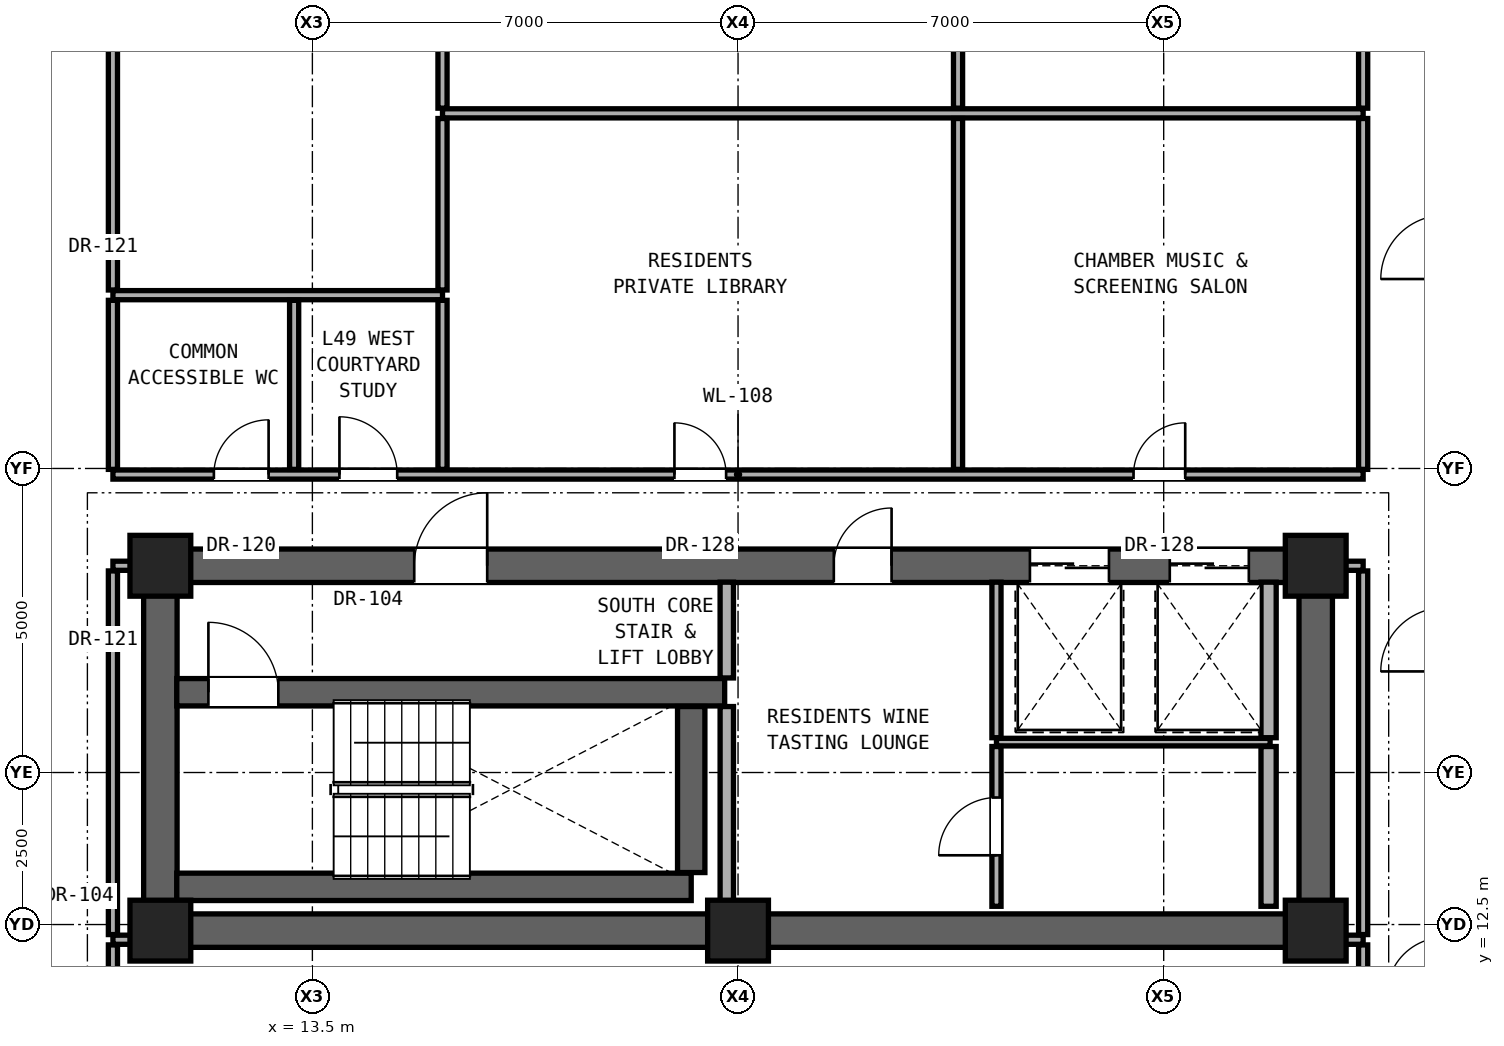
"""IFC4 building model, lengths in metres.
Left out: names, types, materials, properties, quantities, classifications, styles, units other than length and angle.
Written with IfcOpenShell. Run it as: python <this file> out.ifc"""

import sys

from ifc_helpers import new_model, si_unit, direction, frame, frame_2d, origin, origin_2d, place, context, subcontext, project, spatial, rectangle, extrude, element, fill, save


model = new_model("IFC4")
c1 = context("Model", 3, precision=1e-05, world=origin(), true_north=direction((0.0, 1.0)))
c2 = subcontext(c1, "Body", "Model", "MODEL_VIEW")
j1 = project(units=[si_unit("LENGTHUNIT", "METRE"), si_unit("PLANEANGLEUNIT", "RADIAN")], contexts=[c1])
p1 = place(None, origin())
s1 = spatial("IfcSite", under=j1, at=p1, CompositionType="ELEMENT")
p2 = place(p1, origin())
s2 = spatial("IfcBuilding", under=s1, at=p2, CompositionType="ELEMENT")
p3 = place(p2, frame((0.0, 0.0, 173.9)))
s3 = spatial("IfcBuildingStorey", under=s2, at=p3, CompositionType="ELEMENT", Elevation=173.9)
for number, where, z_axis, x_axis in (
    (1, (11.0, 12.4, 0.0), (0.0, 0.0, 1.0), (1.0, 0.0, 0.0)),
    (2, (20.5, 12.4, 0.0), (0.0, 0.0, 1.0), (1.0, 0.0, 0.0)),
    (3, (30.0, 12.4, 0.0), (0.0, 0.0, 1.0), (1.0, 0.0, 0.0)),
    (4, (11.0, 18.4, 0.0), (0.0, 0.0, 1.0), (1.0, 0.0, 0.0)),
    (5, (30.0, 18.4, 0.0), (0.0, 0.0, 1.0), (1.0, 0.0, 0.0)),
):
    element("IfcColumn", number, at=place(p3, frame(where, z_axis=z_axis, x_axis=x_axis)), inside=s3, PredefinedType="COLUMN", context=c2, shape_type="SweptSolid", body=[
        extrude(rectangle(XDim=1.0, YDim=1.0, at=origin_2d()), origin(), (0.0, 0.0, 1.0), 3.25),
    ])
p4 = place(p3, frame((11.0, 12.4, 0.0), z_axis=(0.0, 0.0, 1.0), x_axis=(1.0, 0.0, 0.0)))
e6 = element("IfcWall", 6, at=p4, inside=s3, PredefinedType="SHEAR", context=c2, shape_type="SweptSolid", body=[
    extrude(rectangle(XDim=19.0, YDim=0.55, at=frame_2d((9.5, 0.0))), origin(), (0.0, 0.0, 1.0), 3.05),
])
for number, where, z_axis, x_axis in (
    (7, (11.0, 12.4, 0.0), (0.0, 0.0, 1.0), (0.0, 1.0, 0.0)),
    (8, (30.0, 12.4, 0.0), (0.0, 0.0, 1.0), (0.0, 1.0, 0.0)),
):
    element("IfcWall", number, at=place(p3, frame(where, z_axis=z_axis, x_axis=x_axis)), inside=s3, PredefinedType="SHEAR", context=c2, shape_type="SweptSolid", body=[
        extrude(rectangle(XDim=6.0, YDim=0.55, at=frame_2d((3.0, 0.0))), origin(), (0.0, 0.0, 1.0), 3.05),
    ])
p5 = place(p3, frame((11.0, 18.4, 0.0), z_axis=(0.0, 0.0, 1.0), x_axis=(1.0, 0.0, 0.0)))
e9 = element("IfcWall", 9, at=p5, inside=s3, PredefinedType="SHEAR", context=c2, shape_type="SweptSolid", body=[
    extrude(rectangle(XDim=19.0, YDim=0.55, at=frame_2d((9.5, 0.0))), origin(), (0.0, 0.0, 1.0), 3.05),
])
p6 = place(p5, frame((4.175, 0.0, 0.0)))
e10 = element("IfcOpeningElement", 10, at=p6, cuts=e9, PredefinedType="OPENING", context=c2, shape_type="SweptSolid", body=[
    extrude(rectangle(XDim=1.2, YDim=2.25, at=frame_2d((0.6, 1.125))), frame((0.0, 0.285, 0.0), z_axis=(0.0, -1.0, 0.0), x_axis=(1.0, 0.0, 0.0)), (0.0, 0.0, 1.0), 0.57),
])
p7 = place(p5, frame((11.075, 0.0, 0.0)))
e11 = element("IfcOpeningElement", 11, at=p7, cuts=e9, PredefinedType="OPENING", context=c2, shape_type="SweptSolid", body=[
    extrude(rectangle(XDim=0.95, YDim=2.15, at=frame_2d((0.475, 1.075))), frame((0.0, 0.285, 0.0), z_axis=(0.0, -1.0, 0.0), x_axis=(1.0, 0.0, 0.0)), (0.0, 0.0, 1.0), 0.57),
])
p8 = place(p5, frame((14.3, 0.0, 0.0)))
e12 = element("IfcOpeningElement", 12, at=p8, cuts=e9, PredefinedType="OPENING", context=c2, shape_type="SweptSolid", body=[
    extrude(rectangle(XDim=1.3, YDim=2.3, at=frame_2d((0.65, 1.15))), frame((0.0, 0.285, 0.0), z_axis=(0.0, -1.0, 0.0), x_axis=(1.0, 0.0, 0.0)), (0.0, 0.0, 1.0), 0.57),
])
p9 = place(p5, frame((16.6, 0.0, 0.0)))
e13 = element("IfcOpeningElement", 13, at=p9, cuts=e9, PredefinedType="OPENING", context=c2, shape_type="SweptSolid", body=[
    extrude(rectangle(XDim=1.3, YDim=2.3, at=frame_2d((0.65, 1.15))), frame((0.0, 0.285, 0.0), z_axis=(0.0, -1.0, 0.0), x_axis=(1.0, 0.0, 0.0)), (0.0, 0.0, 1.0), 0.57),
])
for number, where, z_axis, x_axis in (
    (14, (10.22, 12.25, 0.0), (0.0, 0.0, 1.0), (1.0, 0.0, 0.0)),
    (15, (30.27, 12.25, 0.0), (0.0, 0.0, 1.0), (1.0, 0.0, 0.0)),
):
    element("IfcWall", number, at=place(p3, frame(where, z_axis=z_axis, x_axis=x_axis)), inside=s3, PredefinedType="PARTITIONING", context=c2, shape_type="SweptSolid", body=[
        extrude(rectangle(XDim=0.51, YDim=0.15, at=frame_2d((0.255, 0.0))), origin(), (0.0, 0.0, 1.0), 3.05),
    ])
p10 = place(p3, frame((11.27, 13.12, 0.0), z_axis=(0.0, 0.0, 1.0), x_axis=(1.0, 0.0, 0.0)))
e16 = element("IfcWall", 16, at=p10, inside=s3, PredefinedType="SHEAR", context=c2, shape_type="SweptSolid", body=[
    extrude(rectangle(XDim=8.46, YDim=0.45, at=frame_2d((4.23, 0.0))), origin(), (0.0, 0.0, 1.0), 3.05),
])
p11 = place(p3, frame((24.75, 15.5, 0.0), z_axis=(0.0, 0.0, 1.0), x_axis=(1.0, 0.0, 0.0)))
e17 = element("IfcWall", 17, at=p11, inside=s3, PredefinedType="PARTITIONING", context=c2, shape_type="SweptSolid", body=[
    extrude(rectangle(XDim=4.5, YDim=0.125, at=frame_2d((2.25, 0.0))), origin(), (0.0, 0.0, 1.0), 3.05),
])
p12 = place(p3, frame((11.27, 16.32, 0.0), z_axis=(0.0, 0.0, 1.0), x_axis=(1.0, 0.0, 0.0)))
e18 = element("IfcWall", 18, at=p12, inside=s3, PredefinedType="SHEAR", context=c2, shape_type="SweptSolid", body=[
    extrude(rectangle(XDim=9.01, YDim=0.45, at=frame_2d((4.505, 0.0))), origin(), (0.0, 0.0, 1.0), 3.05),
])
p13 = place(p12, frame((0.52, 0.0, 0.0)))
e19 = element("IfcOpeningElement", 19, at=p13, cuts=e18, PredefinedType="OPENING", context=c2, shape_type="SweptSolid", body=[
    extrude(rectangle(XDim=1.15, YDim=2.2, at=frame_2d((0.575, 1.1))), frame((0.0, 0.235, 0.0), z_axis=(0.0, -1.0, 0.0), x_axis=(1.0, 0.0, 0.0)), (0.0, 0.0, 1.0), 0.47),
])
for number, where, z_axis, x_axis in (
    (20, (10.22, 18.4, 0.0), (0.0, 0.0, 1.0), (1.0, 0.0, 0.0)),
    (21, (30.27, 18.4, 0.0), (0.0, 0.0, 1.0), (1.0, 0.0, 0.0)),
):
    element("IfcWall", number, at=place(p3, frame(where, z_axis=z_axis, x_axis=x_axis)), inside=s3, PredefinedType="PARTITIONING", context=c2, shape_type="SweptSolid", body=[
        extrude(rectangle(XDim=0.51, YDim=0.15, at=frame_2d((0.255, 0.0))), origin(), (0.0, 0.0, 1.0), 2.442),
    ])
p14 = place(p3, frame((10.22, 19.9, 0.0), z_axis=(0.0, 0.0, 1.0), x_axis=(1.0, 0.0, 0.0)))
e22 = element("IfcWall", 22, at=p14, inside=s3, PredefinedType="PARTITIONING", context=c2, shape_type="SweptSolid", body=[
    extrude(rectangle(XDim=20.56, YDim=0.15, at=frame_2d((10.28, 0.0))), origin(), (0.0, 0.0, 1.0), 2.186),
])
p15 = place(p14, frame((1.66, 0.0, 0.0)))
e23 = element("IfcOpeningElement", 23, at=p15, cuts=e22, PredefinedType="OPENING", context=c2, shape_type="SweptSolid", body=[
    extrude(rectangle(XDim=0.9, YDim=2.1, at=frame_2d((0.45, 1.05))), frame((0.0, 0.085, 0.0), z_axis=(0.0, -1.0, 0.0), x_axis=(1.0, 0.0, 0.0)), (0.0, 0.0, 1.0), 0.17),
])
p16 = place(p14, frame((3.725, 0.0, 0.0)))
e24 = element("IfcOpeningElement", 24, at=p16, cuts=e22, PredefinedType="OPENING", context=c2, shape_type="SweptSolid", body=[
    extrude(rectangle(XDim=0.95, YDim=2.15, at=frame_2d((0.475, 1.075))), frame((0.0, 0.085, 0.0), z_axis=(0.0, -1.0, 0.0), x_axis=(1.0, 0.0, 0.0)), (0.0, 0.0, 1.0), 0.17),
])
p17 = place(p14, frame((9.234, 0.0, 0.0)))
e25 = element("IfcOpeningElement", 25, at=p17, cuts=e22, PredefinedType="OPENING", context=c2, shape_type="SweptSolid", body=[
    extrude(rectangle(XDim=0.85, YDim=2.01, at=frame_2d((0.425, 1.005))), frame((0.0, 0.085, 0.0), z_axis=(0.0, -1.0, 0.0), x_axis=(1.0, 0.0, 0.0)), (0.0, 0.0, 1.0), 0.17),
])
p18 = place(p14, frame((16.784, 0.0, 0.0)))
e26 = element("IfcOpeningElement", 26, at=p18, cuts=e22, PredefinedType="OPENING", context=c2, shape_type="SweptSolid", body=[
    extrude(rectangle(XDim=0.85, YDim=2.01, at=frame_2d((0.425, 1.005))), frame((0.0, 0.085, 0.0), z_axis=(0.0, -1.0, 0.0), x_axis=(1.0, 0.0, 0.0)), (0.0, 0.0, 1.0), 0.17),
])
p19 = place(p3, frame((10.22, 22.85, 0.0), z_axis=(0.0, 0.0, 1.0), x_axis=(1.0, 0.0, 0.0)))
e27 = element("IfcWall", 27, at=p19, inside=s3, PredefinedType="PARTITIONING", context=c2, shape_type="SweptSolid", body=[
    extrude(rectangle(XDim=5.42, YDim=0.15, at=frame_2d((2.71, 0.0))), origin(), (0.0, 0.0, 1.0), 2.186),
])
p20 = place(p3, frame((15.64, 25.84, 0.0), z_axis=(0.0, 0.0, 1.0), x_axis=(1.0, 0.0, 0.0)))
e28 = element("IfcWall", 28, at=p20, inside=s3, PredefinedType="PARTITIONING", context=c2, shape_type="SweptSolid", body=[
    extrude(rectangle(XDim=15.14, YDim=0.15, at=frame_2d((7.57, 0.0))), origin(), (0.0, 0.0, 1.0), 2.186),
])
p21 = place(p3, frame((10.22, 9.242, 0.0), z_axis=(0.0, 0.0, 1.0), x_axis=(0.0, 1.0, 0.0)))
e29 = element("IfcWall", 29, at=p21, inside=s3, PredefinedType="PARTITIONING", context=c2, shape_type="SweptSolid", body=[
    extrude(rectangle(XDim=2.923, YDim=0.15, at=frame_2d((1.461, 0.0))), origin(), (0.0, 0.0, 1.0), 3.05),
])
p22 = place(p21, frame((0.937, 0.0, 0.0)))
e30 = element("IfcOpeningElement", 30, at=p22, cuts=e29, PredefinedType="OPENING", context=c2, shape_type="SweptSolid", body=[
    extrude(rectangle(XDim=1.05, YDim=2.2, at=frame_2d((0.525, 1.1))), frame((0.0, 0.085, 0.0), z_axis=(0.0, -1.0, 0.0), x_axis=(1.0, 0.0, 0.0)), (0.0, 0.0, 1.0), 0.17),
])
p23 = place(p3, frame((10.22, 12.335, 0.0), z_axis=(0.0, 0.0, 1.0), x_axis=(0.0, 1.0, 0.0)))
e31 = element("IfcWall", 31, at=p23, inside=s3, PredefinedType="PARTITIONING", context=c2, shape_type="SweptSolid", body=[
    extrude(rectangle(XDim=5.98, YDim=0.15, at=frame_2d((2.99, 0.0))), origin(), (0.0, 0.0, 1.0), 2.442),
])
p24 = place(p3, frame((10.22, 19.985, 0.0), z_axis=(0.0, 0.0, 1.0), x_axis=(0.0, 1.0, 0.0)))
e32 = element("IfcWall", 32, at=p24, inside=s3, PredefinedType="PARTITIONING", context=c2, shape_type="SweptSolid", body=[
    extrude(rectangle(XDim=2.78, YDim=0.15, at=frame_2d((1.39, 0.0))), origin(), (0.0, 0.0, 1.0), 3.05),
])
p25 = place(p3, frame((10.22, 22.935, 0.0), z_axis=(0.0, 0.0, 1.0), x_axis=(0.0, 1.0, 0.0)))
e33 = element("IfcWall", 33, at=p25, inside=s3, PredefinedType="PARTITIONING", context=c2, shape_type="SweptSolid", body=[
    extrude(rectangle(XDim=10.08, YDim=0.15, at=frame_2d((5.04, 0.0))), origin(), (0.0, 0.0, 1.0), 2.346),
])
p26 = place(p25, frame((4.565, 0.0, 0.0)))
e34 = element("IfcOpeningElement", 34, at=p26, cuts=e33, PredefinedType="OPENING", context=c2, shape_type="SweptSolid", body=[
    extrude(rectangle(XDim=0.95, YDim=2.15, at=frame_2d((0.475, 1.075))), frame((0.0, 0.085, 0.0), z_axis=(0.0, -1.0, 0.0), x_axis=(1.0, 0.0, 0.0)), (0.0, 0.0, 1.0), 0.17),
])
p27 = place(p3, frame((13.2, 19.985, 0.0), z_axis=(0.0, 0.0, 1.0), x_axis=(0.0, 1.0, 0.0)))
e35 = element("IfcWall", 35, at=p27, inside=s3, PredefinedType="PARTITIONING", context=c2, shape_type="SweptSolid", body=[
    extrude(rectangle(XDim=2.78, YDim=0.15, at=frame_2d((1.39, 0.0))), origin(), (0.0, 0.0, 1.0), 3.05),
])
p28 = place(p3, frame((15.64, 19.985, 0.0), z_axis=(0.0, 0.0, 1.0), x_axis=(0.0, 1.0, 0.0)))
e36 = element("IfcWall", 36, at=p28, inside=s3, PredefinedType="PARTITIONING", context=c2, shape_type="SweptSolid", body=[
    extrude(rectangle(XDim=2.78, YDim=0.15, at=frame_2d((1.39, 0.0))), origin(), (0.0, 0.0, 1.0), 2.625),
])
p29 = place(p3, frame((15.64, 22.935, 0.0), z_axis=(0.0, 0.0, 1.0), x_axis=(0.0, 1.0, 0.0)))
e37 = element("IfcWall", 37, at=p29, inside=s3, PredefinedType="PARTITIONING", context=c2, shape_type="SweptSolid", body=[
    extrude(rectangle(XDim=2.82, YDim=0.15, at=frame_2d((1.41, 0.0))), origin(), (0.0, 0.0, 1.0), 2.186),
])
p30 = place(p3, frame((15.64, 25.925, 0.0), z_axis=(0.0, 0.0, 1.0), x_axis=(0.0, 1.0, 0.0)))
e38 = element("IfcWall", 38, at=p30, inside=s3, PredefinedType="PARTITIONING", context=c2, shape_type="SweptSolid", body=[
    extrude(rectangle(XDim=7.09, YDim=0.15, at=frame_2d((3.545, 0.0))), origin(), (0.0, 0.0, 1.0), 2.186),
])
p31 = place(p3, frame((19.73, 13.355, 0.0), z_axis=(0.0, 0.0, 1.0), x_axis=(0.0, 1.0, 0.0)))
e39 = element("IfcWall", 39, at=p31, inside=s3, PredefinedType="SHEAR", context=c2, shape_type="SweptSolid", body=[
    extrude(rectangle(XDim=2.73, YDim=0.45, at=frame_2d((1.365, 0.0))), origin(), (0.0, 0.0, 1.0), 3.05),
])
p32 = place(p3, frame((20.315, 12.8, 0.0), z_axis=(0.0, 0.0, 1.0), x_axis=(0.0, 1.0, 0.0)))
e40 = element("IfcWall", 40, at=p32, inside=s3, PredefinedType="SOLIDWALL", context=c2, shape_type="SweptSolid", body=[
    extrude(rectangle(XDim=3.285, YDim=0.22, at=frame_2d((1.643, 0.0))), origin(), (0.0, 0.0, 1.0), 3.05),
])
p33 = place(p3, frame((20.315, 16.555, 0.0), z_axis=(0.0, 0.0, 1.0), x_axis=(0.0, 1.0, 0.0)))
e41 = element("IfcWall", 41, at=p33, inside=s3, PredefinedType="SOLIDWALL", context=c2, shape_type="SweptSolid", body=[
    extrude(rectangle(XDim=1.575, YDim=0.22, at=frame_2d((0.788, 0.0))), origin(), (0.0, 0.0, 1.0), 3.05),
])
p34 = place(p3, frame((24.118, 19.985, 0.0), z_axis=(0.0, 0.0, 1.0), x_axis=(0.0, 1.0, 0.0)))
e42 = element("IfcWall", 42, at=p34, inside=s3, PredefinedType="PARTITIONING", context=c2, shape_type="SweptSolid", body=[
    extrude(rectangle(XDim=5.77, YDim=0.15, at=frame_2d((2.885, 0.0))), origin(), (0.0, 0.0, 1.0), 2.186),
])
p35 = place(p3, frame((24.118, 25.925, 0.0), z_axis=(0.0, 0.0, 1.0), x_axis=(0.0, 1.0, 0.0)))
e43 = element("IfcWall", 43, at=p35, inside=s3, PredefinedType="PARTITIONING", context=c2, shape_type="SweptSolid", body=[
    extrude(rectangle(XDim=7.09, YDim=0.15, at=frame_2d((3.545, 0.0))), origin(), (0.0, 0.0, 1.0), 2.186),
])
p36 = place(p3, frame((24.75, 12.8, 0.0), z_axis=(0.0, 0.0, 1.0), x_axis=(0.0, 1.0, 0.0)))
e44 = element("IfcWall", 44, at=p36, inside=s3, PredefinedType="PARTITIONING", context=c2, shape_type="SweptSolid", body=[
    extrude(rectangle(XDim=2.627, YDim=0.15, at=frame_2d((1.314, 0.0))), origin(), (0.0, 0.0, 1.0), 3.05),
])
p37 = place(p36, frame((0.839, 0.0, 0.0)))
e45 = element("IfcOpeningElement", 45, at=p37, cuts=e44, PredefinedType="OPENING", context=c2, shape_type="SweptSolid", body=[
    extrude(rectangle(XDim=0.95, YDim=2.15, at=frame_2d((0.475, 1.075))), frame((0.0, 0.085, 0.0), z_axis=(0.0, -1.0, 0.0), x_axis=(1.0, 0.0, 0.0)), (0.0, 0.0, 1.0), 0.17),
])
p38 = place(p3, frame((24.75, 15.573, 0.0), z_axis=(0.0, 0.0, 1.0), x_axis=(0.0, 1.0, 0.0)))
e46 = element("IfcWall", 46, at=p38, inside=s3, PredefinedType="PARTITIONING", context=c2, shape_type="SweptSolid", body=[
    extrude(rectangle(XDim=2.557, YDim=0.15, at=frame_2d((1.279, 0.0))), origin(), (0.0, 0.0, 1.0), 3.05),
])
p39 = place(p3, frame((29.225, 12.8, 0.0), z_axis=(0.0, 0.0, 1.0), x_axis=(0.0, 1.0, 0.0)))
e47 = element("IfcWall", 47, at=p39, inside=s3, PredefinedType="SOLIDWALL", context=c2, shape_type="SweptSolid", body=[
    extrude(rectangle(XDim=2.627, YDim=0.25, at=frame_2d((1.314, 0.0))), origin(), (0.0, 0.0, 1.0), 3.05),
])
p40 = place(p3, frame((29.225, 15.573, 0.0), z_axis=(0.0, 0.0, 1.0), x_axis=(0.0, 1.0, 0.0)))
e48 = element("IfcWall", 48, at=p40, inside=s3, PredefinedType="SOLIDWALL", context=c2, shape_type="SweptSolid", body=[
    extrude(rectangle(XDim=2.557, YDim=0.25, at=frame_2d((1.279, 0.0))), origin(), (0.0, 0.0, 1.0), 3.05),
])
p41 = place(p3, frame((30.78, 9.242, 0.0), z_axis=(0.0, 0.0, 1.0), x_axis=(0.0, 1.0, 0.0)))
e49 = element("IfcWall", 49, at=p41, inside=s3, PredefinedType="PARTITIONING", context=c2, shape_type="SweptSolid", body=[
    extrude(rectangle(XDim=2.923, YDim=0.15, at=frame_2d((1.461, 0.0))), origin(), (0.0, 0.0, 1.0), 3.05),
])
p42 = place(p3, frame((30.78, 12.335, 0.0), z_axis=(0.0, 0.0, 1.0), x_axis=(0.0, 1.0, 0.0)))
e50 = element("IfcWall", 50, at=p42, inside=s3, PredefinedType="PARTITIONING", context=c2, shape_type="SweptSolid", body=[
    extrude(rectangle(XDim=5.98, YDim=0.15, at=frame_2d((2.99, 0.0))), origin(), (0.0, 0.0, 1.0), 2.442),
])
p43 = place(p3, frame((30.78, 19.985, 0.0), z_axis=(0.0, 0.0, 1.0), x_axis=(0.0, 1.0, 0.0)))
e51 = element("IfcWall", 51, at=p43, inside=s3, PredefinedType="PARTITIONING", context=c2, shape_type="SweptSolid", body=[
    extrude(rectangle(XDim=5.77, YDim=0.15, at=frame_2d((2.885, 0.0))), origin(), (0.0, 0.0, 1.0), 2.346),
])
p44 = place(p3, frame((30.78, 25.925, 0.0), z_axis=(0.0, 0.0, 1.0), x_axis=(0.0, 1.0, 0.0)))
e52 = element("IfcWall", 52, at=p44, inside=s3, PredefinedType="PARTITIONING", context=c2, shape_type="SweptSolid", body=[
    extrude(rectangle(XDim=7.09, YDim=0.15, at=frame_2d((3.545, 0.0))), origin(), (0.0, 0.0, 1.0), 2.346),
])
p45 = place(p6, origin())
e53 = element("IfcDoor", 53, at=p45, inside=s3, OperationType="SINGLE_SWING_RIGHT", PredefinedType="DOOR", context=c2, shape_type="SweptSolid", body=[
    extrude(rectangle(XDim=1.2, YDim=2.25, at=frame_2d((0.6, 1.125))), frame((0.0, 0.025, 0.0), z_axis=(0.0, -1.0, 0.0), x_axis=(1.0, 0.0, 0.0)), (0.0, 0.0, 1.0), 0.05),
])
fill(e10, e53)
p46 = place(p13, origin())
e54 = element("IfcDoor", 54, at=p46, inside=s3, OperationType="SINGLE_SWING_LEFT", PredefinedType="DOOR", context=c2, shape_type="SweptSolid", body=[
    extrude(rectangle(XDim=1.15, YDim=2.2, at=frame_2d((0.575, 1.1))), frame((0.0, 0.025, 0.0), z_axis=(0.0, -1.0, 0.0), x_axis=(1.0, 0.0, 0.0)), (0.0, 0.0, 1.0), 0.05),
])
fill(e19, e54)
p47 = place(p7, origin())
e55 = element("IfcDoor", 55, at=p47, inside=s3, OperationType="SINGLE_SWING_RIGHT", PredefinedType="DOOR", context=c2, shape_type="SweptSolid", body=[
    extrude(rectangle(XDim=0.95, YDim=2.15, at=frame_2d((0.475, 1.075))), frame((0.0, 0.025, 0.0), z_axis=(0.0, -1.0, 0.0), x_axis=(1.0, 0.0, 0.0)), (0.0, 0.0, 1.0), 0.05),
])
fill(e11, e55)
p48 = place(p37, origin())
e56 = element("IfcDoor", 56, at=p48, inside=s3, OperationType="SINGLE_SWING_LEFT", PredefinedType="DOOR", context=c2, shape_type="SweptSolid", body=[
    extrude(rectangle(XDim=0.95, YDim=2.15, at=frame_2d((0.475, 1.075))), frame((0.0, 0.025, 0.0), z_axis=(0.0, -1.0, 0.0), x_axis=(1.0, 0.0, 0.0)), (0.0, 0.0, 1.0), 0.05),
])
fill(e45, e56)
p49 = place(p15, origin())
e57 = element("IfcDoor", 57, at=p49, inside=s3, OperationType="SINGLE_SWING_RIGHT", PredefinedType="DOOR", context=c2, shape_type="SweptSolid", body=[
    extrude(rectangle(XDim=0.9, YDim=2.1, at=frame_2d((0.45, 1.05))), frame((0.0, 0.025, 0.0), z_axis=(0.0, -1.0, 0.0), x_axis=(1.0, 0.0, 0.0)), (0.0, 0.0, 1.0), 0.05),
])
fill(e23, e57)
p50 = place(p16, origin())
e58 = element("IfcDoor", 58, at=p50, inside=s3, OperationType="SINGLE_SWING_LEFT", PredefinedType="DOOR", context=c2, shape_type="SweptSolid", body=[
    extrude(rectangle(XDim=0.95, YDim=2.15, at=frame_2d((0.475, 1.075))), frame((0.0, 0.025, 0.0), z_axis=(0.0, -1.0, 0.0), x_axis=(1.0, 0.0, 0.0)), (0.0, 0.0, 1.0), 0.05),
])
fill(e24, e58)
p51 = place(p17, origin())
e59 = element("IfcDoor", 59, at=p51, inside=s3, OperationType="SINGLE_SWING_LEFT", PredefinedType="DOOR", context=c2, shape_type="SweptSolid", body=[
    extrude(rectangle(XDim=0.85, YDim=2.01, at=frame_2d((0.425, 1.005))), frame((0.0, 0.025, 0.0), z_axis=(0.0, -1.0, 0.0), x_axis=(1.0, 0.0, 0.0)), (0.0, 0.0, 1.0), 0.05),
])
fill(e25, e59)
p52 = place(p18, origin())
e60 = element("IfcDoor", 60, at=p52, inside=s3, OperationType="SINGLE_SWING_RIGHT", PredefinedType="DOOR", context=c2, shape_type="SweptSolid", body=[
    extrude(rectangle(XDim=0.85, YDim=2.01, at=frame_2d((0.425, 1.005))), frame((0.0, 0.025, 0.0), z_axis=(0.0, -1.0, 0.0), x_axis=(1.0, 0.0, 0.0)), (0.0, 0.0, 1.0), 0.05),
])
fill(e26, e60)
p53 = place(p8, origin())
e61 = element("IfcDoor", 61, at=p53, inside=s3, OperationType="DOUBLE_DOOR_SLIDING", PredefinedType="DOOR", context=c2, shape_type="SweptSolid", body=[
    extrude(rectangle(XDim=1.3, YDim=2.3, at=frame_2d((0.65, 1.15))), frame((0.0, 0.025, 0.0), z_axis=(0.0, -1.0, 0.0), x_axis=(1.0, 0.0, 0.0)), (0.0, 0.0, 1.0), 0.05),
])
fill(e12, e61)
p54 = place(p9, origin())
e62 = element("IfcDoor", 62, at=p54, inside=s3, OperationType="DOUBLE_DOOR_SLIDING", PredefinedType="DOOR", context=c2, shape_type="SweptSolid", body=[
    extrude(rectangle(XDim=1.3, YDim=2.3, at=frame_2d((0.65, 1.15))), frame((0.0, 0.025, 0.0), z_axis=(0.0, -1.0, 0.0), x_axis=(1.0, 0.0, 0.0)), (0.0, 0.0, 1.0), 0.05),
])
fill(e13, e62)
save(model, sys.argv[1])
